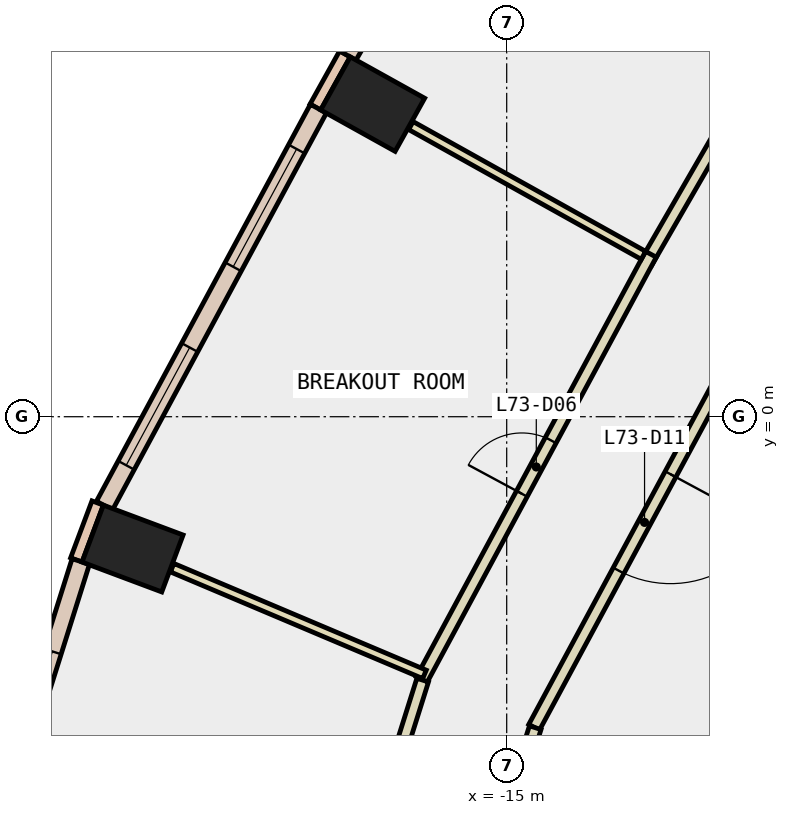
"""IFC4 building model, lengths in metres.
Left out: names, types, materials, properties, quantities, classifications, styles, units other than length and angle.
Written with IfcOpenShell. Run it as: python <this file> out.ifc"""

import sys

from ifc_helpers import new_model, si_unit, direction, frame, frame_2d, origin, origin_2d, place, context, subcontext, project, spatial, rectangle, extrude, element, fill, save


model = new_model("IFC4")
c1 = context("Model", 3, precision=1e-05, world=origin(), true_north=direction((0.0, 1.0)))
c2 = subcontext(c1, "Body", "Model", "MODEL_VIEW")
j1 = project(units=[si_unit("LENGTHUNIT", "METRE"), si_unit("PLANEANGLEUNIT", "RADIAN")], contexts=[c1])
p1 = place(None, origin())
s1 = spatial("IfcSite", under=j1, at=p1, CompositionType="ELEMENT")
p2 = place(p1, origin())
s2 = spatial("IfcBuilding", under=s1, at=p2, CompositionType="ELEMENT")
p3 = place(p2, frame((0.0, 0.0, 311.6)))
s3 = spatial("IfcBuildingStorey", under=s2, at=p3, CompositionType="ELEMENT", Elevation=311.6)
for number, where, z_axis, x_axis in (
    (1, (-17.204, 5.141, -0.34), (0.0, 0.0, 1.0), (0.486, 0.874, 0.0)),
    (2, (-21.153, -2.168, -0.34), (0.0, 0.0, 1.0), (0.351, 0.936, 0.0)),
):
    element("IfcColumn", number, at=place(p3, frame(where, z_axis=z_axis, x_axis=x_axis)), inside=s3, PredefinedType="COLUMN", context=c2, shape_type="SweptSolid", body=[
        extrude(rectangle(XDim=1.0, YDim=1.4, at=origin_2d()), origin(), (0.0, 0.0, 1.0), 3.6),
    ])
p4 = place(p3, frame((-6.279, -3.625, -0.34), z_axis=(0.0, 0.0, 1.0), x_axis=(-0.866017533419, -0.500013631625, 0.0)))
e3 = element("IfcWall", 3, at=p4, inside=s3, PredefinedType="SHEAR", context=c2, shape_type="SweptSolid", body=[
    extrude(rectangle(XDim=9.0, YDim=0.8, at=frame_2d((4.5, 0.0))), origin(), (0.0, 0.0, 1.0), 3.6),
])
p5 = place(p3, frame((-17.661, 5.966, 0.0), z_axis=(0.0, 0.0, 1.0), x_axis=(-0.486036693078, -0.873938403425, 0.0)))
e4 = element("IfcWall", 4, at=p5, inside=s3, PredefinedType="STANDARD", context=c2, shape_type="SweptSolid", body=[
    extrude(rectangle(XDim=1.0, YDim=0.2, at=frame_2d((0.5, 0.0))), origin(), (0.0, 0.0, 1.0), 3.26),
])
p6 = place(p3, frame((-21.727, -1.419, 0.0), z_axis=(0.0, 0.0, 1.0), x_axis=(-0.350962844851, -0.936389385637, 0.0)))
e5 = element("IfcWall", 5, at=p6, inside=s3, PredefinedType="STANDARD", context=c2, shape_type="SweptSolid", body=[
    extrude(rectangle(XDim=1.0, YDim=0.2, at=frame_2d((0.5, 0.0))), origin(), (0.0, 0.0, 1.0), 3.26),
])
p7 = place(p3, frame((-13.947, 12.283, 0.0), z_axis=(0.0, 0.0, 1.0), x_axis=(-0.499923391538, -0.866069629183, 0.0)))
e6 = element("IfcWall", 6, at=p7, inside=s3, PredefinedType="STANDARD", context=c2, shape_type="SweptSolid", body=[
    extrude(rectangle(XDim=7.327, YDim=0.3, at=frame_2d((3.664, 0.0))), origin(), (0.0, 0.0, 1.0), 3.26),
])
p8 = place(p7, frame((0.732, 0.0, 0.9)))
e7 = element("IfcOpeningElement", 7, at=p8, cuts=e6, PredefinedType="OPENING", context=c2, shape_type="SweptSolid", body=[
    extrude(rectangle(XDim=2.2, YDim=2.0, at=frame_2d((1.1, 1.0))), frame((0.0, 0.16, 0.0), z_axis=(0.0, -1.0, 0.0), x_axis=(1.0, 0.0, 0.0)), (0.0, 0.0, 1.0), 0.32),
])
p9 = place(p7, frame((4.395, 0.0, 0.9)))
e8 = element("IfcOpeningElement", 8, at=p9, cuts=e6, PredefinedType="OPENING", context=c2, shape_type="SweptSolid", body=[
    extrude(rectangle(XDim=2.2, YDim=2.0, at=frame_2d((1.1, 1.0))), frame((0.0, 0.16, 0.0), z_axis=(0.0, -1.0, 0.0), x_axis=(1.0, 0.0, 0.0)), (0.0, 0.0, 1.0), 0.32),
])
p10 = place(p3, frame((-18.097, 5.066, 0.0), z_axis=(0.0, 0.0, 1.0), x_axis=(-0.474421773145, -0.880297666228, 0.0)))
e9 = element("IfcWall", 9, at=p10, inside=s3, PredefinedType="STANDARD", context=c2, shape_type="SweptSolid", body=[
    extrude(rectangle(XDim=7.416, YDim=0.3, at=frame_2d((3.708, 0.0))), origin(), (0.0, 0.0, 1.0), 3.26),
])
p11 = place(p10, frame((0.754, 0.0, 0.9)))
e10 = element("IfcOpeningElement", 10, at=p11, cuts=e9, PredefinedType="OPENING", context=c2, shape_type="SweptSolid", body=[
    extrude(rectangle(XDim=2.2, YDim=2.0, at=frame_2d((1.1, 1.0))), frame((0.0, 0.16, 0.0), z_axis=(0.0, -1.0, 0.0), x_axis=(1.0, 0.0, 0.0)), (0.0, 0.0, 1.0), 0.32),
])
p12 = place(p10, frame((4.462, 0.0, 0.9)))
e11 = element("IfcOpeningElement", 11, at=p12, cuts=e9, PredefinedType="OPENING", context=c2, shape_type="SweptSolid", body=[
    extrude(rectangle(XDim=2.2, YDim=2.0, at=frame_2d((1.1, 1.0))), frame((0.0, 0.16, 0.0), z_axis=(0.0, -1.0, 0.0), x_axis=(1.0, 0.0, 0.0)), (0.0, 0.0, 1.0), 0.32),
])
p13 = place(p3, frame((-22.005, -2.381, 0.0), z_axis=(0.0, 0.0, 1.0), x_axis=(-0.300534385574, -0.953770980418, 0.0)))
e12 = element("IfcWall", 12, at=p13, inside=s3, PredefinedType="STANDARD", context=c2, shape_type="SweptSolid", body=[
    extrude(rectangle(XDim=4.502, YDim=0.3, at=frame_2d((2.251, 0.0))), origin(), (0.0, 0.0, 1.0), 3.26),
])
p14 = place(p13, frame((1.551, 0.0, 0.9)))
e13 = element("IfcOpeningElement", 13, at=p14, cuts=e12, PredefinedType="OPENING", context=c2, shape_type="SweptSolid", body=[
    extrude(rectangle(XDim=1.4, YDim=2.0, at=frame_2d((0.7, 1.0))), frame((0.0, 0.16, 0.0), z_axis=(0.0, -1.0, 0.0), x_axis=(1.0, 0.0, 0.0)), (0.0, 0.0, 1.0), 0.32),
])
p15 = place(p3, frame((-10.917, 1.631, 0.0), z_axis=(0.0, 0.0, 1.0), x_axis=(-0.47449538478, -0.880257990491, 0.0)))
e14 = element("IfcWall", 14, at=p15, inside=s3, PredefinedType="PARTITIONING", context=c2, shape_type="SweptSolid", body=[
    extrude(rectangle(XDim=7.655, YDim=0.2, at=frame_2d((3.827, 0.0))), origin(), (0.0, 0.0, 1.0), 3.26),
])
p16 = place(p15, frame((2.927, 0.0, 0.0)))
e15 = element("IfcOpeningElement", 15, at=p16, cuts=e14, PredefinedType="OPENING", context=c2, shape_type="SweptSolid", body=[
    extrude(rectangle(XDim=1.8, YDim=2.1, at=frame_2d((0.9, 1.05))), frame((0.0, 0.11, 0.0), z_axis=(0.0, -1.0, 0.0), x_axis=(1.0, 0.0, 0.0)), (0.0, 0.0, 1.0), 0.22),
])
p17 = place(p3, frame((-14.531, -5.114, 0.0), z_axis=(0.0, 0.0, 1.0), x_axis=(-0.300501248013, -0.953781421471, 0.0)))
e16 = element("IfcWall", 16, at=p17, inside=s3, PredefinedType="PARTITIONING", context=c2, shape_type="SweptSolid", body=[
    extrude(rectangle(XDim=2.559, YDim=0.2, at=frame_2d((1.28, 0.0))), origin(), (0.0, 0.0, 1.0), 3.26),
])
p18 = place(p3, frame((-12.701, 2.54, 0.0), z_axis=(0.0, 0.0, 1.0), x_axis=(0.499946799636, 0.86605611685, 0.0)))
e17 = element("IfcWall", 17, at=p18, inside=s3, PredefinedType="PARTITIONING", context=c2, shape_type="SweptSolid", body=[
    extrude(rectangle(XDim=8.227, YDim=0.2, at=frame_2d((4.114, 0.0))), origin(), (0.0, 0.0, 1.0), 3.26),
])
p19 = place(p18, frame((3.613, 0.0, 0.0)))
e18 = element("IfcOpeningElement", 18, at=p19, cuts=e17, PredefinedType="OPENING", context=c2, shape_type="SweptSolid", body=[
    extrude(rectangle(XDim=1.0, YDim=2.1, at=frame_2d((0.5, 1.05))), frame((0.0, 0.11, 0.0), z_axis=(0.0, -1.0, 0.0), x_axis=(1.0, 0.0, 0.0)), (0.0, 0.0, 1.0), 0.22),
])
p20 = place(p3, frame((-16.399, -4.325, 0.0), z_axis=(0.0, 0.0, 1.0), x_axis=(0.474489967676, 0.880260910512, 0.0)))
e19 = element("IfcWall", 19, at=p20, inside=s3, PredefinedType="PARTITIONING", context=c2, shape_type="SweptSolid", body=[
    extrude(rectangle(XDim=7.948, YDim=0.2, at=frame_2d((3.974, 0.0))), origin(), (0.0, 0.0, 1.0), 3.26),
])
p21 = place(p20, frame((3.474, 0.0, 0.0)))
e20 = element("IfcOpeningElement", 20, at=p21, cuts=e19, PredefinedType="OPENING", context=c2, shape_type="SweptSolid", body=[
    extrude(rectangle(XDim=1.0, YDim=2.1, at=frame_2d((0.5, 1.05))), frame((0.0, 0.11, 0.0), z_axis=(0.0, -1.0, 0.0), x_axis=(1.0, 0.0, 0.0)), (0.0, 0.0, 1.0), 0.22),
])
p22 = place(p3, frame((-17.375, -7.487, 0.0), z_axis=(0.0, 0.0, 1.0), x_axis=(0.300195088058, 0.953877827138, 0.0)))
e21 = element("IfcWall", 21, at=p22, inside=s3, PredefinedType="PARTITIONING", context=c2, shape_type="SweptSolid", body=[
    extrude(rectangle(XDim=3.308, YDim=0.2, at=frame_2d((1.654, 0.0))), origin(), (0.0, 0.0, 1.0), 3.26),
])
p23 = place(p3, frame((-12.751, 2.654, 0.0), z_axis=(0.0, 0.0, 1.0), x_axis=(-0.873277679945, 0.487222837837, 0.0)))
e22 = element("IfcWall", 22, at=p23, inside=s3, PredefinedType="PARTITIONING", context=c2, shape_type="SweptSolid", body=[
    extrude(rectangle(XDim=4.38, YDim=0.15, at=frame_2d((2.19, 0.0))), origin(), (0.0, 0.0, 1.0), 3.26),
])
p24 = place(p3, frame((-16.352, -4.237, 0.0), z_axis=(0.0, 0.0, 1.0), x_axis=(-0.921092849348, 0.389342988738, 0.0)))
e23 = element("IfcWall", 23, at=p24, inside=s3, PredefinedType="PARTITIONING", context=c2, shape_type="SweptSolid", body=[
    extrude(rectangle(XDim=4.505, YDim=0.15, at=frame_2d((2.253, 0.0))), origin(), (0.0, 0.0, 1.0), 3.26),
])
p25 = place(p11, origin())
e24 = element("IfcWindow", 24, at=p25, inside=s3, PartitioningType="SINGLE_PANEL", PredefinedType="WINDOW", context=c2, shape_type="SweptSolid", body=[
    extrude(rectangle(XDim=2.2, YDim=2.0, at=frame_2d((1.1, 1.0))), frame((0.0, 0.03, 0.0), z_axis=(0.0, -1.0, 0.0), x_axis=(1.0, 0.0, 0.0)), (0.0, 0.0, 1.0), 0.06),
])
fill(e10, e24)
p26 = place(p12, origin())
e25 = element("IfcWindow", 25, at=p26, inside=s3, PartitioningType="SINGLE_PANEL", PredefinedType="WINDOW", context=c2, shape_type="SweptSolid", body=[
    extrude(rectangle(XDim=2.2, YDim=2.0, at=frame_2d((1.1, 1.0))), frame((0.0, 0.03, 0.0), z_axis=(0.0, -1.0, 0.0), x_axis=(1.0, 0.0, 0.0)), (0.0, 0.0, 1.0), 0.06),
])
fill(e11, e25)
p27 = place(p14, origin())
e26 = element("IfcWindow", 26, at=p27, inside=s3, PartitioningType="SINGLE_PANEL", PredefinedType="WINDOW", context=c2, shape_type="SweptSolid", body=[
    extrude(rectangle(XDim=1.4, YDim=2.0, at=frame_2d((0.7, 1.0))), frame((0.0, 0.03, 0.0), z_axis=(0.0, -1.0, 0.0), x_axis=(1.0, 0.0, 0.0)), (0.0, 0.0, 1.0), 0.06),
])
fill(e13, e26)
p28 = place(p21, origin())
e27 = element("IfcDoor", 27, at=p28, inside=s3, OperationType="SINGLE_SWING_LEFT", PredefinedType="DOOR", context=c2, shape_type="SweptSolid", body=[
    extrude(rectangle(XDim=1.0, YDim=2.1, at=frame_2d((0.5, 1.05))), frame((0.0, 0.025, 0.0), z_axis=(0.0, -1.0, 0.0), x_axis=(1.0, 0.0, 0.0)), (0.0, 0.0, 1.0), 0.05),
])
fill(e20, e27)
p29 = place(p16, origin())
e28 = element("IfcDoor", 28, at=p29, inside=s3, OperationType="DOUBLE_DOOR_SINGLE_SWING", PredefinedType="DOOR", context=c2, shape_type="SweptSolid", body=[
    extrude(rectangle(XDim=1.8, YDim=2.1, at=frame_2d((0.9, 1.05))), frame((0.0, 0.025, 0.0), z_axis=(0.0, -1.0, 0.0), x_axis=(1.0, 0.0, 0.0)), (0.0, 0.0, 1.0), 0.05),
])
fill(e15, e28)
save(model, sys.argv[1])
